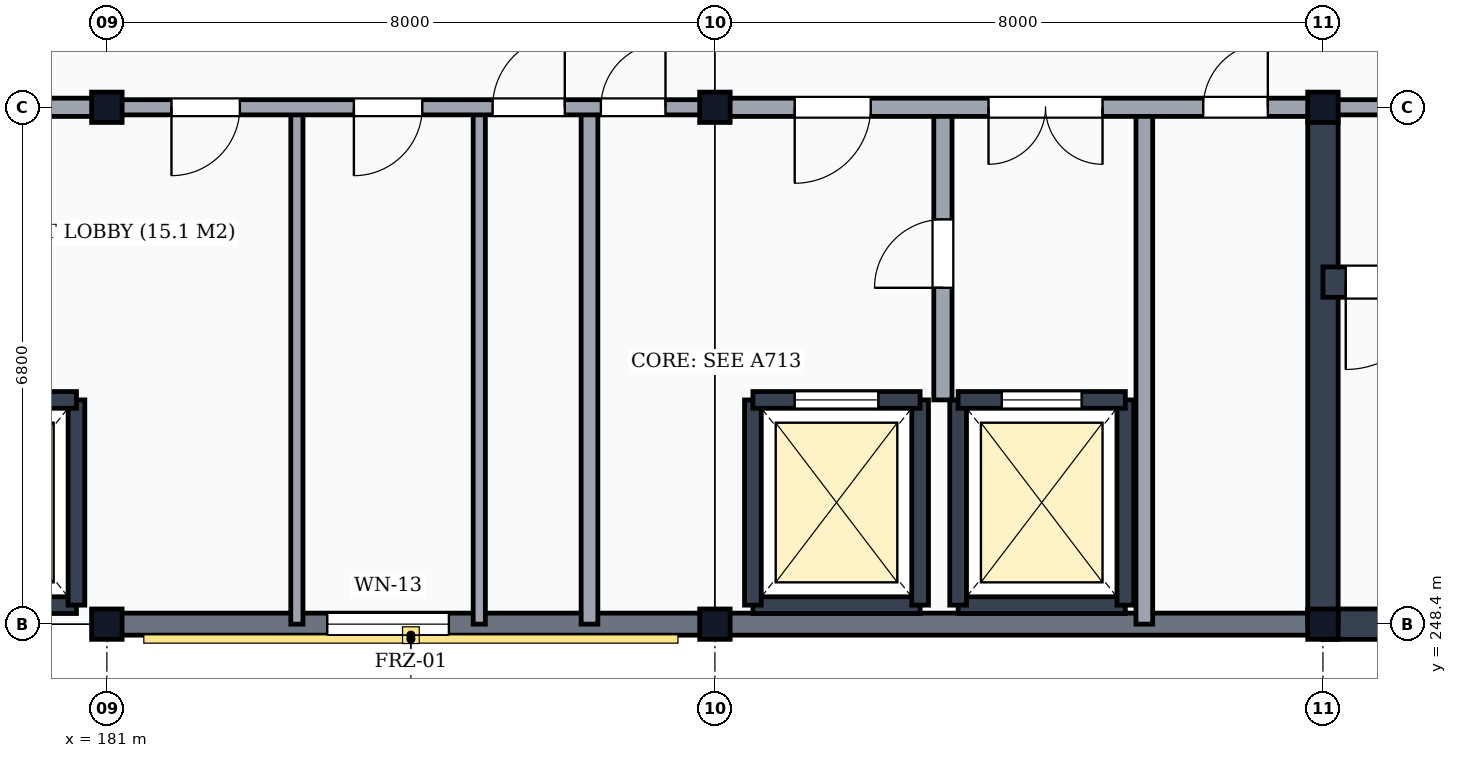
"""IFC4 building model, lengths in metres.
Left out: names, types, materials, properties, quantities, classifications, styles, units other than length and angle.
Written with IfcOpenShell. Run it as: python <this file> out.ifc"""

import sys

from ifc_helpers import new_model, si_unit, direction, frame, frame_2d, origin, origin_2d, place, context, subcontext, project, spatial, rectangle, i_section, extrude, element, fill, save


model = new_model("IFC4")
c1 = context("Model", 3, precision=1e-05, world=origin(), true_north=direction((0.0, 1.0)))
c2 = subcontext(c1, "Body", "Model", "MODEL_VIEW")
j1 = project(units=[si_unit("LENGTHUNIT", "METRE"), si_unit("PLANEANGLEUNIT", "RADIAN")], contexts=[c1])
p1 = place(None, origin())
s1 = spatial("IfcSite", under=j1, at=p1, CompositionType="ELEMENT")
p2 = place(p1, origin())
s2 = spatial("IfcBuilding", under=s1, at=p2, CompositionType="ELEMENT")
p3 = place(p2, frame((0.0, 0.0, 15.6)))
s3 = spatial("IfcBuildingStorey", under=s2, at=p3, CompositionType="ELEMENT", Elevation=15.6)
for number, where, z_axis, x_axis in (
    (1, (181.0, 248.4, 0.0), (0.0, 0.0, 1.0), (1.0, 0.0, 0.0)),
    (2, (181.0, 255.2, 0.0), (0.0, 0.0, 1.0), (1.0, 0.0, 0.0)),
    (3, (189.0, 248.4, 0.0), (0.0, 0.0, 1.0), (1.0, 0.0, 0.0)),
    (4, (189.0, 255.2, 0.0), (0.0, 0.0, 1.0), (1.0, 0.0, 0.0)),
    (5, (197.0, 248.4, 0.0), (0.0, 0.0, 1.0), (1.0, 0.0, 0.0)),
    (6, (197.0, 255.2, 0.0), (0.0, 0.0, 1.0), (1.0, 0.0, 0.0)),
):
    element("IfcColumn", number, at=place(p3, frame(where, z_axis=z_axis, x_axis=x_axis)), inside=s3, PredefinedType="COLUMN", context=c2, shape_type="SweptSolid", body=[
        extrude(i_section(OverallWidth=0.401, OverallDepth=0.399, WebThickness=0.025, FlangeThickness=0.04, FilletRadius=0.015, at=origin_2d()), origin(), (0.0, 0.0, 1.0), 4.8),
    ])
p4 = place(p3, frame((181.006, 248.4, 0.0), z_axis=(0.0, 0.0, 1.0), x_axis=(1.0, 0.0, 0.0)))
e7 = element("IfcWall", 7, at=p4, inside=s3, PredefinedType="SOLIDWALL", context=c2, shape_type="SweptSolid", body=[
    extrude(rectangle(XDim=7.988, YDim=0.29, at=frame_2d((3.994, 0.0))), origin(), (0.0, 0.0, 1.0), 4.168),
])
p5 = place(p4, frame((2.894, 0.0, 0.95)))
e8 = element("IfcOpeningElement", 8, at=p5, cuts=e7, PredefinedType="OPENING", context=c2, shape_type="SweptSolid", body=[
    extrude(rectangle(XDim=1.6, YDim=2.0, at=frame_2d((0.8, 1.0))), frame((0.0, 0.16, 0.0), z_axis=(0.0, -1.0, 0.0), x_axis=(1.0, 0.0, 0.0)), (0.0, 0.0, 1.0), 0.32),
])
p6 = place(p3, frame((189.006, 248.4, 0.0), z_axis=(0.0, 0.0, 1.0), x_axis=(1.0, 0.0, 0.0)))
e9 = element("IfcWall", 9, at=p6, inside=s3, PredefinedType="SOLIDWALL", context=c2, shape_type="SweptSolid", body=[
    extrude(rectangle(XDim=7.988, YDim=0.29, at=frame_2d((3.994, 0.0))), origin(), (0.0, 0.0, 1.0), 4.168),
])
p7 = place(p3, frame((197.0, 248.4, 0.0), z_axis=(0.0, 0.0, 1.0), x_axis=(1.0, 0.0, 0.0)))
e10 = element("IfcWall", 10, at=p7, inside=s3, PredefinedType="SHEAR", context=c2, shape_type="SweptSolid", body=[
    extrude(rectangle(XDim=8.0, YDim=0.4, at=frame_2d((4.0, 0.0))), origin(), (0.0, 0.0, 1.0), 4.48),
])
p8 = place(p3, frame((197.0, 248.4, 0.0), z_axis=(0.0, 0.0, 1.0), x_axis=(0.0, 1.0, 0.0)))
e11 = element("IfcWall", 11, at=p8, inside=s3, PredefinedType="SHEAR", context=c2, shape_type="SweptSolid", body=[
    extrude(rectangle(XDim=6.8, YDim=0.4, at=frame_2d((3.4, 0.0))), origin(), (0.0, 0.0, 1.0), 4.48),
])
p9 = place(p3, frame((197.0, 252.9, 0.0), z_axis=(0.0, 0.0, 1.0), x_axis=(1.0, 0.0, 0.0)))
e12 = element("IfcWall", 12, at=p9, inside=s3, PredefinedType="SHEAR", context=c2, shape_type="SweptSolid", body=[
    extrude(rectangle(XDim=8.0, YDim=0.4, at=frame_2d((4.0, 0.0))), origin(), (0.0, 0.0, 1.0), 4.48),
])
p10 = place(p9, frame((0.3, 0.0, 0.0)))
e13 = element("IfcOpeningElement", 13, at=p10, cuts=e12, PredefinedType="OPENING", context=c2, shape_type="SweptSolid", body=[
    extrude(rectangle(XDim=1.15, YDim=2.15, at=frame_2d((0.575, 1.075))), frame((0.0, 0.215, 0.0), z_axis=(0.0, -1.0, 0.0), x_axis=(1.0, 0.0, 0.0)), (0.0, 0.0, 1.0), 0.43),
])
p11 = place(p3, frame((197.0, 255.2, 0.0), z_axis=(0.0, 0.0, 1.0), x_axis=(1.0, 0.0, 0.0)))
e14 = element("IfcWall", 14, at=p11, inside=s3, PredefinedType="PARTITIONING", context=c2, shape_type="SweptSolid", body=[
    extrude(rectangle(XDim=8.0, YDim=0.2, at=frame_2d((4.0, 0.0))), origin(), (0.0, 0.0, 1.0), 3.928),
])
p12 = place(p11, frame((3.275, 0.0, 0.0)))
e15 = element("IfcOpeningElement", 15, at=p12, cuts=e14, PredefinedType="OPENING", context=c2, shape_type="SweptSolid", body=[
    extrude(rectangle(XDim=1.45, YDim=2.2, at=frame_2d((0.725, 1.1))), frame((0.0, 0.115, 0.0), z_axis=(0.0, -1.0, 0.0), x_axis=(1.0, 0.0, 0.0)), (0.0, 0.0, 1.0), 0.23),
])
p13 = place(p3, frame((178.4, 248.65, 0.0), z_axis=(0.0, 0.0, 1.0), x_axis=(1.0, 0.0, 0.0)))
e16 = element("IfcWall", 16, at=p13, inside=s3, PredefinedType="SHEAR", context=c2, shape_type="SweptSolid", body=[
    extrude(rectangle(XDim=2.2, YDim=0.22, at=frame_2d((1.1, 0.0))), origin(), (0.0, 0.0, 1.0), 4.48),
])
p14 = place(p3, frame((180.6, 248.65, 0.0), z_axis=(0.0, 0.0, 1.0), x_axis=(0.0, 1.0, 0.0)))
e17 = element("IfcWall", 17, at=p14, inside=s3, PredefinedType="SHEAR", context=c2, shape_type="SweptSolid", body=[
    extrude(rectangle(XDim=2.7, YDim=0.22, at=frame_2d((1.35, 0.0))), origin(), (0.0, 0.0, 1.0), 4.48),
])
p15 = place(p3, frame((178.4, 251.35, 0.0), z_axis=(0.0, 0.0, 1.0), x_axis=(1.0, 0.0, 0.0)))
e18 = element("IfcWall", 18, at=p15, inside=s3, PredefinedType="SHEAR", context=c2, shape_type="SweptSolid", body=[
    extrude(rectangle(XDim=2.2, YDim=0.22, at=frame_2d((1.1, 0.0))), origin(), (0.0, 0.0, 1.0), 4.48),
])
p16 = place(p15, frame((0.575, 0.0, 0.0)))
e19 = element("IfcOpeningElement", 19, at=p16, cuts=e18, PredefinedType="OPENING", context=c2, shape_type="SweptSolid", body=[
    extrude(rectangle(XDim=1.05, YDim=2.15, at=frame_2d((0.525, 1.075))), frame((0.0, 0.125, 0.0), z_axis=(0.0, -1.0, 0.0), x_axis=(1.0, 0.0, 0.0)), (0.0, 0.0, 1.0), 0.25),
])
p17 = place(p3, frame((189.5, 248.65, 0.0), z_axis=(0.0, 0.0, 1.0), x_axis=(1.0, 0.0, 0.0)))
e20 = element("IfcWall", 20, at=p17, inside=s3, PredefinedType="SHEAR", context=c2, shape_type="SweptSolid", body=[
    extrude(rectangle(XDim=2.2, YDim=0.22, at=frame_2d((1.1, 0.0))), origin(), (0.0, 0.0, 1.0), 4.48),
])
for number, where, z_axis, x_axis in (
    (21, (189.5, 248.65, 0.0), (0.0, 0.0, 1.0), (0.0, 1.0, 0.0)),
    (22, (191.7, 248.65, 0.0), (0.0, 0.0, 1.0), (0.0, 1.0, 0.0)),
):
    element("IfcWall", number, at=place(p3, frame(where, z_axis=z_axis, x_axis=x_axis)), inside=s3, PredefinedType="SHEAR", context=c2, shape_type="SweptSolid", body=[
        extrude(rectangle(XDim=2.7, YDim=0.22, at=frame_2d((1.35, 0.0))), origin(), (0.0, 0.0, 1.0), 4.48),
    ])
p18 = place(p3, frame((189.5, 251.35, 0.0), z_axis=(0.0, 0.0, 1.0), x_axis=(1.0, 0.0, 0.0)))
e23 = element("IfcWall", 23, at=p18, inside=s3, PredefinedType="SHEAR", context=c2, shape_type="SweptSolid", body=[
    extrude(rectangle(XDim=2.2, YDim=0.22, at=frame_2d((1.1, 0.0))), origin(), (0.0, 0.0, 1.0), 4.48),
])
p19 = place(p18, frame((0.55, 0.0, 0.0)))
e24 = element("IfcOpeningElement", 24, at=p19, cuts=e23, PredefinedType="OPENING", context=c2, shape_type="SweptSolid", body=[
    extrude(rectangle(XDim=1.1, YDim=2.15, at=frame_2d((0.55, 1.075))), frame((0.0, 0.125, 0.0), z_axis=(0.0, -1.0, 0.0), x_axis=(1.0, 0.0, 0.0)), (0.0, 0.0, 1.0), 0.25),
])
p20 = place(p3, frame((192.2, 248.65, 0.0), z_axis=(0.0, 0.0, 1.0), x_axis=(1.0, 0.0, 0.0)))
e25 = element("IfcWall", 25, at=p20, inside=s3, PredefinedType="SHEAR", context=c2, shape_type="SweptSolid", body=[
    extrude(rectangle(XDim=2.2, YDim=0.22, at=frame_2d((1.1, 0.0))), origin(), (0.0, 0.0, 1.0), 4.48),
])
for number, where, z_axis, x_axis in (
    (26, (192.2, 248.65, 0.0), (0.0, 0.0, 1.0), (0.0, 1.0, 0.0)),
    (27, (194.4, 248.65, 0.0), (0.0, 0.0, 1.0), (0.0, 1.0, 0.0)),
):
    element("IfcWall", number, at=place(p3, frame(where, z_axis=z_axis, x_axis=x_axis)), inside=s3, PredefinedType="SHEAR", context=c2, shape_type="SweptSolid", body=[
        extrude(rectangle(XDim=2.7, YDim=0.22, at=frame_2d((1.35, 0.0))), origin(), (0.0, 0.0, 1.0), 4.48),
    ])
p21 = place(p3, frame((192.2, 251.35, 0.0), z_axis=(0.0, 0.0, 1.0), x_axis=(1.0, 0.0, 0.0)))
e28 = element("IfcWall", 28, at=p21, inside=s3, PredefinedType="SHEAR", context=c2, shape_type="SweptSolid", body=[
    extrude(rectangle(XDim=2.2, YDim=0.22, at=frame_2d((1.1, 0.0))), origin(), (0.0, 0.0, 1.0), 4.48),
])
p22 = place(p21, frame((0.575, 0.0, 0.0)))
e29 = element("IfcOpeningElement", 29, at=p22, cuts=e28, PredefinedType="OPENING", context=c2, shape_type="SweptSolid", body=[
    extrude(rectangle(XDim=1.05, YDim=2.15, at=frame_2d((0.525, 1.075))), frame((0.0, 0.125, 0.0), z_axis=(0.0, -1.0, 0.0), x_axis=(1.0, 0.0, 0.0)), (0.0, 0.0, 1.0), 0.25),
])
p23 = place(p3, frame((192.0, 251.35, 0.0), z_axis=(0.0, 0.0, 1.0), x_axis=(0.0, 1.0, 0.0)))
e30 = element("IfcWall", 30, at=p23, inside=s3, PredefinedType="PARTITIONING", context=c2, shape_type="SweptSolid", body=[
    extrude(rectangle(XDim=3.85, YDim=0.24, at=frame_2d((1.925, 0.0))), origin(), (0.0, 0.0, 1.0), 4.48),
])
p24 = place(p23, frame((1.475, 0.0, 0.0)))
e31 = element("IfcOpeningElement", 31, at=p24, cuts=e30, PredefinedType="OPENING", context=c2, shape_type="SweptSolid", body=[
    extrude(rectangle(XDim=0.9, YDim=2.1, at=frame_2d((0.45, 1.05))), frame((0.0, 0.135, 0.0), z_axis=(0.0, -1.0, 0.0), x_axis=(1.0, 0.0, 0.0)), (0.0, 0.0, 1.0), 0.27),
])
p25 = place(p3, frame((194.65, 248.4, 0.0), z_axis=(0.0, 0.0, 1.0), x_axis=(0.0, 1.0, 0.0)))
e32 = element("IfcWall", 32, at=p25, inside=s3, PredefinedType="PARTITIONING", context=c2, shape_type="SweptSolid", body=[
    extrude(rectangle(XDim=6.8, YDim=0.22, at=frame_2d((3.4, 0.0))), origin(), (0.0, 0.0, 1.0), 4.48),
])
for number, where, z_axis, x_axis in (
    (33, (183.5, 248.4, 0.0), (0.0, 0.0, 1.0), (0.0, 1.0, 0.0)),
    (34, (185.9, 248.4, 0.0), (0.0, 0.0, 1.0), (0.0, 1.0, 0.0)),
):
    element("IfcWall", number, at=place(p3, frame(where, z_axis=z_axis, x_axis=x_axis)), inside=s3, PredefinedType="PARTITIONING", context=c2, shape_type="SweptSolid", body=[
        extrude(rectangle(XDim=6.8, YDim=0.16, at=frame_2d((3.4, 0.0))), origin(), (0.0, 0.0, 1.0), 4.48),
    ])
p26 = place(p3, frame((187.35, 248.4, 0.0), z_axis=(0.0, 0.0, 1.0), x_axis=(0.0, 1.0, 0.0)))
e35 = element("IfcWall", 35, at=p26, inside=s3, PredefinedType="PARTITIONING", context=c2, shape_type="SweptSolid", body=[
    extrude(rectangle(XDim=6.8, YDim=0.22, at=frame_2d((3.4, 0.0))), origin(), (0.0, 0.0, 1.0), 4.48),
])
p27 = place(p3, frame((173.0, 255.2, 0.0), z_axis=(0.0, 0.0, 1.0), x_axis=(1.0, 0.0, 0.0)))
e36 = element("IfcWall", 36, at=p27, inside=s3, PredefinedType="PARTITIONING", context=c2, shape_type="SweptSolid", body=[
    extrude(rectangle(XDim=8.0, YDim=0.24, at=frame_2d((4.0, 0.0))), origin(), (0.0, 0.0, 1.0), 3.928),
])
p28 = place(p27, frame((1.05, 0.0, 0.0)))
e37 = element("IfcOpeningElement", 37, at=p28, cuts=e36, PredefinedType="OPENING", context=c2, shape_type="SweptSolid", body=[
    extrude(rectangle(XDim=1.0, YDim=2.1, at=frame_2d((0.5, 1.05))), frame((0.0, 0.135, 0.0), z_axis=(0.0, -1.0, 0.0), x_axis=(1.0, 0.0, 0.0)), (0.0, 0.0, 1.0), 0.27),
])
p29 = place(p27, frame((4.6, 0.0, 0.0)))
e38 = element("IfcOpeningElement", 38, at=p29, cuts=e36, PredefinedType="OPENING", context=c2, shape_type="SweptSolid", body=[
    extrude(rectangle(XDim=1.6, YDim=2.25, at=frame_2d((0.8, 1.125))), frame((0.0, 0.135, 0.0), z_axis=(0.0, -1.0, 0.0), x_axis=(1.0, 0.0, 0.0)), (0.0, 0.0, 1.0), 0.27),
])
p30 = place(p3, frame((181.0, 255.2, 0.0), z_axis=(0.0, 0.0, 1.0), x_axis=(1.0, 0.0, 0.0)))
e39 = element("IfcWall", 39, at=p30, inside=s3, PredefinedType="PARTITIONING", context=c2, shape_type="SweptSolid", body=[
    extrude(rectangle(XDim=8.0, YDim=0.2, at=frame_2d((4.0, 0.0))), origin(), (0.0, 0.0, 1.0), 3.928),
])
p31 = place(p30, frame((0.85, 0.0, 0.0)))
e40 = element("IfcOpeningElement", 40, at=p31, cuts=e39, PredefinedType="OPENING", context=c2, shape_type="SweptSolid", body=[
    extrude(rectangle(XDim=0.9, YDim=2.1, at=frame_2d((0.45, 1.05))), frame((0.0, 0.115, 0.0), z_axis=(0.0, -1.0, 0.0), x_axis=(1.0, 0.0, 0.0)), (0.0, 0.0, 1.0), 0.23),
])
p32 = place(p30, frame((3.25, 0.0, 0.0)))
e41 = element("IfcOpeningElement", 41, at=p32, cuts=e39, PredefinedType="OPENING", context=c2, shape_type="SweptSolid", body=[
    extrude(rectangle(XDim=0.9, YDim=2.1, at=frame_2d((0.45, 1.05))), frame((0.0, 0.115, 0.0), z_axis=(0.0, -1.0, 0.0), x_axis=(1.0, 0.0, 0.0)), (0.0, 0.0, 1.0), 0.23),
])
p33 = place(p30, frame((5.075, 0.0, 0.0)))
e42 = element("IfcOpeningElement", 42, at=p33, cuts=e39, PredefinedType="OPENING", context=c2, shape_type="SweptSolid", body=[
    extrude(rectangle(XDim=0.95, YDim=2.1, at=frame_2d((0.475, 1.05))), frame((0.0, 0.115, 0.0), z_axis=(0.0, -1.0, 0.0), x_axis=(1.0, 0.0, 0.0)), (0.0, 0.0, 1.0), 0.23),
])
p34 = place(p30, frame((6.5, 0.0, 0.0)))
e43 = element("IfcOpeningElement", 43, at=p34, cuts=e39, PredefinedType="OPENING", context=c2, shape_type="SweptSolid", body=[
    extrude(rectangle(XDim=0.85, YDim=2.1, at=frame_2d((0.425, 1.05))), frame((0.0, 0.115, 0.0), z_axis=(0.0, -1.0, 0.0), x_axis=(1.0, 0.0, 0.0)), (0.0, 0.0, 1.0), 0.23),
])
p35 = place(p3, frame((189.0, 255.2, 0.0), z_axis=(0.0, 0.0, 1.0), x_axis=(1.0, 0.0, 0.0)))
e44 = element("IfcWall", 44, at=p35, inside=s3, PredefinedType="PARTITIONING", context=c2, shape_type="SweptSolid", body=[
    extrude(rectangle(XDim=8.0, YDim=0.24, at=frame_2d((4.0, 0.0))), origin(), (0.0, 0.0, 1.0), 3.928),
])
p36 = place(p35, frame((1.05, 0.0, 0.0)))
e45 = element("IfcOpeningElement", 45, at=p36, cuts=e44, PredefinedType="OPENING", context=c2, shape_type="SweptSolid", body=[
    extrude(rectangle(XDim=1.0, YDim=2.1, at=frame_2d((0.5, 1.05))), frame((0.0, 0.135, 0.0), z_axis=(0.0, -1.0, 0.0), x_axis=(1.0, 0.0, 0.0)), (0.0, 0.0, 1.0), 0.27),
])
p37 = place(p35, frame((3.6, 0.0, 0.0)))
e46 = element("IfcOpeningElement", 46, at=p37, cuts=e44, PredefinedType="OPENING", context=c2, shape_type="SweptSolid", body=[
    extrude(rectangle(XDim=1.5, YDim=2.25, at=frame_2d((0.75, 1.125))), frame((0.0, 0.135, 0.0), z_axis=(0.0, -1.0, 0.0), x_axis=(1.0, 0.0, 0.0)), (0.0, 0.0, 1.0), 0.27),
])
p38 = place(p35, frame((6.425, 0.0, 0.0)))
e47 = element("IfcOpeningElement", 47, at=p38, cuts=e44, PredefinedType="OPENING", context=c2, shape_type="SweptSolid", body=[
    extrude(rectangle(XDim=0.85, YDim=2.1, at=frame_2d((0.425, 1.05))), frame((0.0, 0.135, 0.0), z_axis=(0.0, -1.0, 0.0), x_axis=(1.0, 0.0, 0.0)), (0.0, 0.0, 1.0), 0.27),
])
p39 = place(p5, origin())
e48 = element("IfcWindow", 48, at=p39, inside=s3, PartitioningType="SINGLE_PANEL", PredefinedType="WINDOW", context=c2, shape_type="SweptSolid", body=[
    extrude(rectangle(XDim=1.6, YDim=2.0, at=frame_2d((0.8, 1.0))), frame((0.0, 0.03, 0.0), z_axis=(0.0, -1.0, 0.0), x_axis=(1.0, 0.0, 0.0)), (0.0, 0.0, 1.0), 0.06),
])
fill(e8, e48)
p40 = place(p10, frame((1.15, 0.0, 0.0), z_axis=(0.0, 0.0, 1.0), x_axis=(-1.0, 0.0, 0.0)))
e49 = element("IfcDoor", 49, at=p40, inside=s3, OperationType="SINGLE_SWING_RIGHT", PredefinedType="DOOR", context=c2, shape_type="SweptSolid", body=[
    extrude(rectangle(XDim=1.15, YDim=2.15, at=frame_2d((0.575, 1.075))), frame((0.0, 0.025, 0.0), z_axis=(0.0, -1.0, 0.0), x_axis=(1.0, 0.0, 0.0)), (0.0, 0.0, 1.0), 0.05),
])
fill(e13, e49)
p41 = place(p19, origin())
e50 = element("IfcDoor", 50, at=p41, inside=s3, OperationType="DOUBLE_DOOR_SLIDING", PredefinedType="USERDEFINED", context=c2, shape_type="SweptSolid", body=[
    extrude(rectangle(XDim=1.1, YDim=2.15, at=frame_2d((0.55, 1.075))), frame((0.0, 0.025, 0.0), z_axis=(0.0, -1.0, 0.0), x_axis=(1.0, 0.0, 0.0)), (0.0, 0.0, 1.0), 0.05),
])
fill(e24, e50)
p42 = place(p22, origin())
e51 = element("IfcDoor", 51, at=p42, inside=s3, OperationType="DOUBLE_DOOR_SLIDING", PredefinedType="USERDEFINED", context=c2, shape_type="SweptSolid", body=[
    extrude(rectangle(XDim=1.05, YDim=2.15, at=frame_2d((0.525, 1.075))), frame((0.0, 0.025, 0.0), z_axis=(0.0, -1.0, 0.0), x_axis=(1.0, 0.0, 0.0)), (0.0, 0.0, 1.0), 0.05),
])
fill(e29, e51)
p43 = place(p24, origin())
e52 = element("IfcDoor", 52, at=p43, inside=s3, OperationType="SINGLE_SWING_LEFT", PredefinedType="DOOR", context=c2, shape_type="SweptSolid", body=[
    extrude(rectangle(XDim=0.9, YDim=2.1, at=frame_2d((0.45, 1.05))), frame((0.0, 0.025, 0.0), z_axis=(0.0, -1.0, 0.0), x_axis=(1.0, 0.0, 0.0)), (0.0, 0.0, 1.0), 0.05),
])
fill(e31, e52)
p44 = place(p31, frame((0.9, 0.0, 0.0), z_axis=(0.0, 0.0, 1.0), x_axis=(-1.0, 0.0, 0.0)))
e53 = element("IfcDoor", 53, at=p44, inside=s3, OperationType="SINGLE_SWING_RIGHT", PredefinedType="DOOR", context=c2, shape_type="SweptSolid", body=[
    extrude(rectangle(XDim=0.9, YDim=2.1, at=frame_2d((0.45, 1.05))), frame((0.0, 0.025, 0.0), z_axis=(0.0, -1.0, 0.0), x_axis=(1.0, 0.0, 0.0)), (0.0, 0.0, 1.0), 0.05),
])
fill(e40, e53)
p45 = place(p32, frame((0.9, 0.0, 0.0), z_axis=(0.0, 0.0, 1.0), x_axis=(-1.0, 0.0, 0.0)))
e54 = element("IfcDoor", 54, at=p45, inside=s3, OperationType="SINGLE_SWING_RIGHT", PredefinedType="DOOR", context=c2, shape_type="SweptSolid", body=[
    extrude(rectangle(XDim=0.9, YDim=2.1, at=frame_2d((0.45, 1.05))), frame((0.0, 0.025, 0.0), z_axis=(0.0, -1.0, 0.0), x_axis=(1.0, 0.0, 0.0)), (0.0, 0.0, 1.0), 0.05),
])
fill(e41, e54)
p46 = place(p33, frame((0.95, 0.0, 0.0), z_axis=(0.0, 0.0, 1.0), x_axis=(-1.0, 0.0, 0.0)))
e55 = element("IfcDoor", 55, at=p46, inside=s3, OperationType="SINGLE_SWING_LEFT", PredefinedType="DOOR", context=c2, shape_type="SweptSolid", body=[
    extrude(rectangle(XDim=0.95, YDim=2.1, at=frame_2d((0.475, 1.05))), frame((0.0, 0.025, 0.0), z_axis=(0.0, -1.0, 0.0), x_axis=(1.0, 0.0, 0.0)), (0.0, 0.0, 1.0), 0.05),
])
fill(e42, e55)
p47 = place(p34, frame((0.85, 0.0, 0.0), z_axis=(0.0, 0.0, 1.0), x_axis=(-1.0, 0.0, 0.0)))
e56 = element("IfcDoor", 56, at=p47, inside=s3, OperationType="SINGLE_SWING_LEFT", PredefinedType="DOOR", context=c2, shape_type="SweptSolid", body=[
    extrude(rectangle(XDim=0.85, YDim=2.1, at=frame_2d((0.425, 1.05))), frame((0.0, 0.025, 0.0), z_axis=(0.0, -1.0, 0.0), x_axis=(1.0, 0.0, 0.0)), (0.0, 0.0, 1.0), 0.05),
])
fill(e43, e56)
p48 = place(p36, frame((1.0, 0.0, 0.0), z_axis=(0.0, 0.0, 1.0), x_axis=(-1.0, 0.0, 0.0)))
e57 = element("IfcDoor", 57, at=p48, inside=s3, OperationType="SINGLE_SWING_RIGHT", PredefinedType="DOOR", context=c2, shape_type="SweptSolid", body=[
    extrude(rectangle(XDim=1.0, YDim=2.1, at=frame_2d((0.5, 1.05))), frame((0.0, 0.025, 0.0), z_axis=(0.0, -1.0, 0.0), x_axis=(1.0, 0.0, 0.0)), (0.0, 0.0, 1.0), 0.05),
])
fill(e45, e57)
p49 = place(p37, frame((1.5, 0.0, 0.0), z_axis=(0.0, 0.0, 1.0), x_axis=(-1.0, 0.0, 0.0)))
e58 = element("IfcDoor", 58, at=p49, inside=s3, OperationType="DOUBLE_DOOR_SINGLE_SWING", PredefinedType="DOOR", context=c2, shape_type="SweptSolid", body=[
    extrude(rectangle(XDim=1.5, YDim=2.25, at=frame_2d((0.75, 1.125))), frame((0.0, 0.025, 0.0), z_axis=(0.0, -1.0, 0.0), x_axis=(1.0, 0.0, 0.0)), (0.0, 0.0, 1.0), 0.05),
])
fill(e46, e58)
p50 = place(p38, frame((0.85, 0.0, 0.0), z_axis=(0.0, 0.0, 1.0), x_axis=(-1.0, 0.0, 0.0)))
e59 = element("IfcDoor", 59, at=p50, inside=s3, OperationType="SINGLE_SWING_LEFT", PredefinedType="DOOR", context=c2, shape_type="SweptSolid", body=[
    extrude(rectangle(XDim=0.85, YDim=2.1, at=frame_2d((0.425, 1.05))), frame((0.0, 0.025, 0.0), z_axis=(0.0, -1.0, 0.0), x_axis=(1.0, 0.0, 0.0)), (0.0, 0.0, 1.0), 0.05),
])
fill(e47, e59)
save(model, sys.argv[1])
